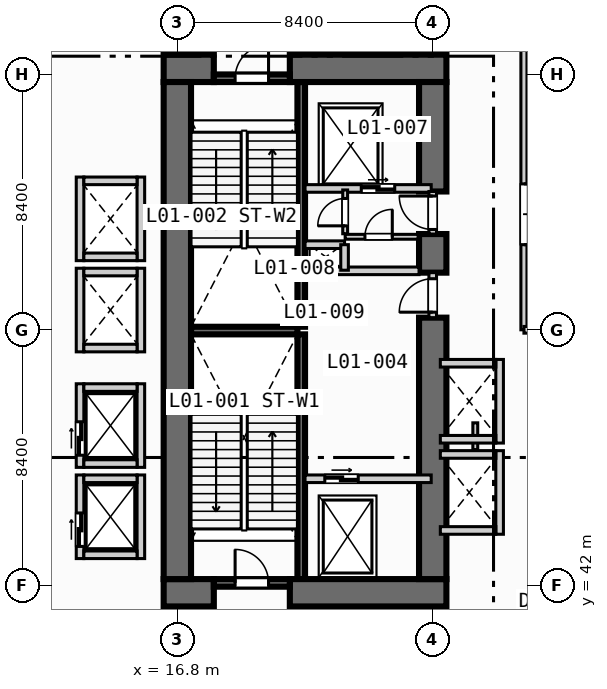
"""IFC4 building model, lengths in metres.
Left out: names, types, materials, properties, quantities, classifications, styles, units other than length and angle.
Written with IfcOpenShell. Run it as: python <this file> out.ifc"""

import sys

from ifc_helpers import new_model, si_unit, direction, frame, frame_2d, origin, place, context, subcontext, project, spatial, rectangle, extrude, element, fill, save


model = new_model("IFC4")
c1 = context("Model", 3, precision=1e-05, world=origin(), true_north=direction((0.0, 1.0)))
c2 = subcontext(c1, "Body", "Model", "MODEL_VIEW")
j1 = project(units=[si_unit("LENGTHUNIT", "METRE"), si_unit("PLANEANGLEUNIT", "RADIAN")], contexts=[c1])
p1 = place(None, origin())
s1 = spatial("IfcSite", under=j1, at=p1, CompositionType="ELEMENT")
p2 = place(p1, origin())
s2 = spatial("IfcBuilding", under=s1, at=p2, CompositionType="ELEMENT")
p3 = place(p2, frame((0.0, 0.0, 6.0)))
s3 = spatial("IfcBuildingStorey", under=s2, at=p3, CompositionType="ELEMENT", Elevation=6.0)
for number, where, z_axis, x_axis in (
    (1, (20.875, 42.2, 0.0), (0.0, 0.0, 1.0), (0.0, 1.0, 0.0)),
    (2, (20.875, 50.5, 0.0), (0.0, 0.0, 1.0), (0.0, 1.0, 0.0)),
):
    element("IfcWall", number, at=place(p3, frame(where, z_axis=z_axis, x_axis=x_axis)), inside=s3, PredefinedType="SOLIDWALL", context=c2, shape_type="SweptSolid", body=[
        extrude(rectangle(XDim=8.05, YDim=0.25, at=frame_2d((4.025, 0.0))), origin(), (0.0, 0.0, 1.0), 4.45),
    ])
p4 = place(p3, frame((17.25, 50.375, 0.0), z_axis=(0.0, 0.0, 1.0), x_axis=(1.0, 0.0, 0.0)))
e3 = element("IfcWall", 3, at=p4, inside=s3, PredefinedType="SOLIDWALL", context=c2, shape_type="SweptSolid", body=[
    extrude(rectangle(XDim=3.5, YDim=0.25, at=frame_2d((1.75, 0.0))), origin(), (0.0, 0.0, 1.0), 4.45),
])
p5 = place(p3, frame((16.35, 41.75, 0.0), z_axis=(0.0, 0.0, 1.0), x_axis=(1.0, 0.0, 0.0)))
e4 = element("IfcWall", 4, at=p5, inside=s3, PredefinedType="SHEAR", context=c2, shape_type="SweptSolid", body=[
    extrude(rectangle(XDim=1.65, YDim=0.9, at=frame_2d((0.825, 0.0))), origin(), (0.0, 0.0, 1.0), 4.45),
])
p6 = place(p3, frame((20.5, 41.75, 0.0), z_axis=(0.0, 0.0, 1.0), x_axis=(1.0, 0.0, 0.0)))
e5 = element("IfcWall", 5, at=p6, inside=s3, PredefinedType="SHEAR", context=c2, shape_type="SweptSolid", body=[
    extrude(rectangle(XDim=5.15, YDim=0.9, at=frame_2d((2.575, 0.0))), origin(), (0.0, 0.0, 1.0), 4.45),
])
p7 = place(p3, frame((16.35, 59.0, 0.0), z_axis=(0.0, 0.0, 1.0), x_axis=(1.0, 0.0, 0.0)))
e6 = element("IfcWall", 6, at=p7, inside=s3, PredefinedType="SHEAR", context=c2, shape_type="SweptSolid", body=[
    extrude(rectangle(XDim=1.65, YDim=0.9, at=frame_2d((0.825, 0.0))), origin(), (0.0, 0.0, 1.0), 4.45),
])
p8 = place(p3, frame((20.5, 59.0, 0.0), z_axis=(0.0, 0.0, 1.0), x_axis=(1.0, 0.0, 0.0)))
e7 = element("IfcWall", 7, at=p8, inside=s3, PredefinedType="SHEAR", context=c2, shape_type="SweptSolid", body=[
    extrude(rectangle(XDim=5.15, YDim=0.9, at=frame_2d((2.575, 0.0))), origin(), (0.0, 0.0, 1.0), 4.45),
])
p9 = place(p3, frame((16.8, 42.2, 0.0), z_axis=(0.0, 0.0, 1.0), x_axis=(0.0, 1.0, 0.0)))
e8 = element("IfcWall", 8, at=p9, inside=s3, PredefinedType="SHEAR", context=c2, shape_type="SweptSolid", body=[
    extrude(rectangle(XDim=16.35, YDim=0.9, at=frame_2d((8.175, 0.0))), origin(), (0.0, 0.0, 1.0), 4.45),
])
p10 = place(p3, frame((25.2, 42.2, 0.0), z_axis=(0.0, 0.0, 1.0), x_axis=(0.0, 1.0, 0.0)))
e9 = element("IfcWall", 9, at=p10, inside=s3, PredefinedType="SHEAR", context=c2, shape_type="SweptSolid", body=[
    extrude(rectangle(XDim=8.6, YDim=0.9, at=frame_2d((4.3, 0.0))), origin(), (0.0, 0.0, 1.0), 4.45),
])
p11 = place(p3, frame((25.2, 52.28, 0.0), z_axis=(0.0, 0.0, 1.0), x_axis=(0.0, 1.0, 0.0)))
e10 = element("IfcWall", 10, at=p11, inside=s3, PredefinedType="SHEAR", context=c2, shape_type="SweptSolid", body=[
    extrude(rectangle(XDim=1.27, YDim=0.9, at=frame_2d((0.635, 0.0))), origin(), (0.0, 0.0, 1.0), 4.45),
])
p12 = place(p3, frame((25.2, 54.95, 0.0), z_axis=(0.0, 0.0, 1.0), x_axis=(0.0, 1.0, 0.0)))
e11 = element("IfcWall", 11, at=p12, inside=s3, PredefinedType="SHEAR", context=c2, shape_type="SweptSolid", body=[
    extrude(rectangle(XDim=3.6, YDim=0.9, at=frame_2d((1.8, 0.0))), origin(), (0.0, 0.0, 1.0), 4.45),
])
p13 = place(p3, frame((18.0, 42.075, 0.0), z_axis=(0.0, 0.0, 1.0), x_axis=(1.0, 0.0, 0.0)))
e12 = element("IfcWall", 12, at=p13, inside=s3, PredefinedType="SOLIDWALL", context=c2, shape_type="SweptSolid", body=[
    extrude(rectangle(XDim=2.5, YDim=0.25, at=frame_2d((1.25, 0.0))), origin(), (0.0, 0.0, 1.0), 4.45),
])
p14 = place(p13, frame((0.7, 0.0, 0.0)))
e13 = element("IfcOpeningElement", 13, at=p14, cuts=e12, PredefinedType="OPENING", context=c2, shape_type="SweptSolid", body=[
    extrude(rectangle(XDim=1.1, YDim=2.15, at=frame_2d((0.55, 1.075))), frame((0.0, 0.135, 0.0), z_axis=(0.0, -1.0, 0.0), x_axis=(1.0, 0.0, 0.0)), (0.0, 0.0, 1.0), 0.27),
])
p15 = place(p3, frame((18.0, 58.675, 0.0), z_axis=(0.0, 0.0, 1.0), x_axis=(1.0, 0.0, 0.0)))
e14 = element("IfcWall", 14, at=p15, inside=s3, PredefinedType="SOLIDWALL", context=c2, shape_type="SweptSolid", body=[
    extrude(rectangle(XDim=2.5, YDim=0.25, at=frame_2d((1.25, 0.0))), origin(), (0.0, 0.0, 1.0), 4.45),
])
p16 = place(p15, frame((0.7, 0.0, 0.0)))
e15 = element("IfcOpeningElement", 15, at=p16, cuts=e14, PredefinedType="OPENING", context=c2, shape_type="SweptSolid", body=[
    extrude(rectangle(XDim=1.1, YDim=2.15, at=frame_2d((0.55, 1.075))), frame((0.0, 0.135, 0.0), z_axis=(0.0, -1.0, 0.0), x_axis=(1.0, 0.0, 0.0)), (0.0, 0.0, 1.0), 0.27),
])
p17 = place(p3, frame((21.0, 45.5, 0.0), z_axis=(0.0, 0.0, 1.0), x_axis=(1.0, 0.0, 0.0)))
e16 = element("IfcWall", 16, at=p17, inside=s3, PredefinedType="SOLIDWALL", context=c2, shape_type="SweptSolid", body=[
    extrude(rectangle(XDim=4.15, YDim=0.25, at=frame_2d((2.075, 0.0))), origin(), (0.0, 0.0, 1.0), 4.45),
])
p18 = place(p17, frame((0.65, 0.0, 0.0)))
e17 = element("IfcOpeningElement", 17, at=p18, cuts=e16, PredefinedType="OPENING", context=c2, shape_type="SweptSolid", body=[
    extrude(rectangle(XDim=1.1, YDim=2.15, at=frame_2d((0.55, 1.075))), frame((0.0, 0.135, 0.0), z_axis=(0.0, -1.0, 0.0), x_axis=(1.0, 0.0, 0.0)), (0.0, 0.0, 1.0), 0.27),
])
p19 = place(p3, frame((25.2, 50.8, 0.0), z_axis=(0.0, 0.0, 1.0), x_axis=(0.0, 1.0, 0.0)))
e18 = element("IfcWall", 18, at=p19, inside=s3, PredefinedType="SOLIDWALL", context=c2, shape_type="SweptSolid", body=[
    extrude(rectangle(XDim=1.48, YDim=0.25, at=frame_2d((0.74, 0.0))), origin(), (0.0, 0.0, 1.0), 4.45),
])
p20 = place(p19, frame((0.18, 0.0, 0.0)))
e19 = element("IfcOpeningElement", 19, at=p20, cuts=e18, PredefinedType="OPENING", context=c2, shape_type="SweptSolid", body=[
    extrude(rectangle(XDim=1.1, YDim=2.15, at=frame_2d((0.55, 1.075))), frame((0.0, 0.135, 0.0), z_axis=(0.0, -1.0, 0.0), x_axis=(1.0, 0.0, 0.0)), (0.0, 0.0, 1.0), 0.27),
])
p21 = place(p3, frame((21.0, 52.34, 0.0), z_axis=(0.0, 0.0, 1.0), x_axis=(1.0, 0.0, 0.0)))
e20 = element("IfcWall", 20, at=p21, inside=s3, PredefinedType="SOLIDWALL", context=c2, shape_type="SweptSolid", body=[
    extrude(rectangle(XDim=3.75, YDim=0.25, at=frame_2d((1.875, 0.0))), origin(), (0.0, 0.0, 1.0), 4.45),
])
p22 = place(p3, frame((21.0, 55.05, 0.0), z_axis=(0.0, 0.0, 1.0), x_axis=(1.0, 0.0, 0.0)))
e21 = element("IfcWall", 21, at=p22, inside=s3, PredefinedType="SOLIDWALL", context=c2, shape_type="SweptSolid", body=[
    extrude(rectangle(XDim=4.15, YDim=0.25, at=frame_2d((2.075, 0.0))), origin(), (0.0, 0.0, 1.0), 4.45),
])
p23 = place(p22, frame((1.85, 0.0, 0.0)))
e22 = element("IfcOpeningElement", 22, at=p23, cuts=e21, PredefinedType="OPENING", context=c2, shape_type="SweptSolid", body=[
    extrude(rectangle(XDim=1.1, YDim=2.15, at=frame_2d((0.55, 1.075))), frame((0.0, 0.135, 0.0), z_axis=(0.0, -1.0, 0.0), x_axis=(1.0, 0.0, 0.0)), (0.0, 0.0, 1.0), 0.27),
])
p24 = place(p3, frame((25.2, 53.55, 0.0), z_axis=(0.0, 0.0, 1.0), x_axis=(0.0, 1.0, 0.0)))
e23 = element("IfcWall", 23, at=p24, inside=s3, PredefinedType="SOLIDWALL", context=c2, shape_type="SweptSolid", body=[
    extrude(rectangle(XDim=1.4, YDim=0.25, at=frame_2d((0.7, 0.0))), origin(), (0.0, 0.0, 1.0), 4.45),
])
p25 = place(p24, frame((0.15, 0.0, 0.0)))
e24 = element("IfcOpeningElement", 24, at=p25, cuts=e23, PredefinedType="OPENING", context=c2, shape_type="SweptSolid", body=[
    extrude(rectangle(XDim=1.1, YDim=2.15, at=frame_2d((0.55, 1.075))), frame((0.0, 0.135, 0.0), z_axis=(0.0, -1.0, 0.0), x_axis=(1.0, 0.0, 0.0)), (0.0, 0.0, 1.0), 0.27),
])
p26 = place(p3, frame((21.0, 53.2, 0.0), z_axis=(0.0, 0.0, 1.0), x_axis=(1.0, 0.0, 0.0)))
e25 = element("IfcWall", 25, at=p26, inside=s3, PredefinedType="SOLIDWALL", context=c2, shape_type="SweptSolid", body=[
    extrude(rectangle(XDim=1.3, YDim=0.25, at=frame_2d((0.65, 0.0))), origin(), (0.0, 0.0, 1.0), 4.45),
])
p27 = place(p3, frame((22.3, 52.36, 0.0), z_axis=(0.0, 0.0, 1.0), x_axis=(0.0, 1.0, 0.0)))
e26 = element("IfcWall", 26, at=p27, inside=s3, PredefinedType="SOLIDWALL", context=c2, shape_type="SweptSolid", body=[
    extrude(rectangle(XDim=0.84, YDim=0.25, at=frame_2d((0.42, 0.0))), origin(), (0.0, 0.0, 1.0), 4.45),
])
p28 = place(p3, frame((22.32, 53.56, 0.0), z_axis=(0.0, 0.0, 1.0), x_axis=(0.0, 1.0, 0.0)))
e27 = element("IfcWall", 27, at=p28, inside=s3, PredefinedType="PARTITIONING", context=c2, shape_type="SweptSolid", body=[
    extrude(rectangle(XDim=1.44, YDim=0.16, at=frame_2d((0.72, 0.0))), origin(), (0.0, 0.0, 1.0), 4.45),
])
p29 = place(p28, frame((0.26, 0.0, 0.0)))
e28 = element("IfcOpeningElement", 28, at=p29, cuts=e27, PredefinedType="OPENING", context=c2, shape_type="SweptSolid", body=[
    extrude(rectangle(XDim=0.9, YDim=2.1, at=frame_2d((0.45, 1.05))), frame((0.0, 0.09, 0.0), z_axis=(0.0, -1.0, 0.0), x_axis=(1.0, 0.0, 0.0)), (0.0, 0.0, 1.0), 0.18),
])
p30 = place(p3, frame((22.32, 53.46, 0.0), z_axis=(0.0, 0.0, 1.0), x_axis=(1.0, 0.0, 0.0)))
e29 = element("IfcWall", 29, at=p30, inside=s3, PredefinedType="PARTITIONING", context=c2, shape_type="SweptSolid", body=[
    extrude(rectangle(XDim=2.4, YDim=0.16, at=frame_2d((1.2, 0.0))), origin(), (0.0, 0.0, 1.0), 4.45),
])
p31 = place(p30, frame((0.65, 0.0, 0.0)))
e30 = element("IfcOpeningElement", 30, at=p31, cuts=e29, PredefinedType="OPENING", context=c2, shape_type="SweptSolid", body=[
    extrude(rectangle(XDim=0.9, YDim=2.1, at=frame_2d((0.45, 1.05))), frame((0.0, 0.09, 0.0), z_axis=(0.0, -1.0, 0.0), x_axis=(1.0, 0.0, 0.0)), (0.0, 0.0, 1.0), 0.18),
])
p32 = place(p3, frame((13.6, 42.875, 0.0), z_axis=(0.0, 0.0, 1.0), x_axis=(0.0, 1.0, 0.0)))
e31 = element("IfcWall", 31, at=p32, inside=s3, PredefinedType="SOLIDWALL", context=c2, shape_type="SweptSolid", body=[
    extrude(rectangle(XDim=2.75, YDim=0.25, at=frame_2d((1.375, 0.0))), origin(), (0.0, 0.0, 1.0), 4.45),
])
p33 = place(p32, frame((0.4, 0.0, 0.0)))
e32 = element("IfcOpeningElement", 32, at=p33, cuts=e31, PredefinedType="OPENING", context=c2, shape_type="SweptSolid", body=[
    extrude(rectangle(XDim=1.1, YDim=2.15, at=frame_2d((0.55, 1.075))), frame((0.0, 0.135, 0.0), z_axis=(0.0, -1.0, 0.0), x_axis=(1.0, 0.0, 0.0)), (0.0, 0.0, 1.0), 0.27),
])
p34 = place(p3, frame((15.6, 42.875, 0.0), z_axis=(0.0, 0.0, 1.0), x_axis=(0.0, 1.0, 0.0)))
e33 = element("IfcWall", 33, at=p34, inside=s3, PredefinedType="SOLIDWALL", context=c2, shape_type="SweptSolid", body=[
    extrude(rectangle(XDim=2.75, YDim=0.25, at=frame_2d((1.375, 0.0))), origin(), (0.0, 0.0, 1.0), 4.45),
])
for number, where, z_axis, x_axis in (
    (34, (13.725, 43.0, 0.0), (0.0, 0.0, 1.0), (1.0, 0.0, 0.0)),
    (35, (13.725, 45.5, 0.0), (0.0, 0.0, 1.0), (1.0, 0.0, 0.0)),
):
    element("IfcWall", number, at=place(p3, frame(where, z_axis=z_axis, x_axis=x_axis)), inside=s3, PredefinedType="SOLIDWALL", context=c2, shape_type="SweptSolid", body=[
        extrude(rectangle(XDim=1.75, YDim=0.25, at=frame_2d((0.875, 0.0))), origin(), (0.0, 0.0, 1.0), 4.45),
    ])
p35 = place(p3, frame((13.6, 45.875, 0.0), z_axis=(0.0, 0.0, 1.0), x_axis=(0.0, 1.0, 0.0)))
e36 = element("IfcWall", 36, at=p35, inside=s3, PredefinedType="SOLIDWALL", context=c2, shape_type="SweptSolid", body=[
    extrude(rectangle(XDim=2.75, YDim=0.25, at=frame_2d((1.375, 0.0))), origin(), (0.0, 0.0, 1.0), 4.45),
])
p36 = place(p35, frame((0.4, 0.0, 0.0)))
e37 = element("IfcOpeningElement", 37, at=p36, cuts=e36, PredefinedType="OPENING", context=c2, shape_type="SweptSolid", body=[
    extrude(rectangle(XDim=1.1, YDim=2.15, at=frame_2d((0.55, 1.075))), frame((0.0, 0.135, 0.0), z_axis=(0.0, -1.0, 0.0), x_axis=(1.0, 0.0, 0.0)), (0.0, 0.0, 1.0), 0.27),
])
p37 = place(p3, frame((15.6, 45.875, 0.0), z_axis=(0.0, 0.0, 1.0), x_axis=(0.0, 1.0, 0.0)))
e38 = element("IfcWall", 38, at=p37, inside=s3, PredefinedType="SOLIDWALL", context=c2, shape_type="SweptSolid", body=[
    extrude(rectangle(XDim=2.75, YDim=0.25, at=frame_2d((1.375, 0.0))), origin(), (0.0, 0.0, 1.0), 4.45),
])
for number, where, z_axis, x_axis in (
    (39, (13.725, 46.0, 0.0), (0.0, 0.0, 1.0), (1.0, 0.0, 0.0)),
    (40, (13.725, 48.5, 0.0), (0.0, 0.0, 1.0), (1.0, 0.0, 0.0)),
):
    element("IfcWall", number, at=place(p3, frame(where, z_axis=z_axis, x_axis=x_axis)), inside=s3, PredefinedType="SOLIDWALL", context=c2, shape_type="SweptSolid", body=[
        extrude(rectangle(XDim=1.75, YDim=0.25, at=frame_2d((0.875, 0.0))), origin(), (0.0, 0.0, 1.0), 4.45),
    ])
for number, where, z_axis, x_axis in (
    (41, (13.6, 49.675, 0.0), (0.0, 0.0, 1.0), (0.0, 1.0, 0.0)),
    (42, (15.6, 49.675, 0.0), (0.0, 0.0, 1.0), (0.0, 1.0, 0.0)),
):
    element("IfcWall", number, at=place(p3, frame(where, z_axis=z_axis, x_axis=x_axis)), inside=s3, PredefinedType="SOLIDWALL", context=c2, shape_type="SweptSolid", body=[
        extrude(rectangle(XDim=2.75, YDim=0.25, at=frame_2d((1.375, 0.0))), origin(), (0.0, 0.0, 1.0), 4.45),
    ])
for number, where, z_axis, x_axis in (
    (43, (13.725, 49.8, 0.0), (0.0, 0.0, 1.0), (1.0, 0.0, 0.0)),
    (44, (13.725, 52.3, 0.0), (0.0, 0.0, 1.0), (1.0, 0.0, 0.0)),
):
    element("IfcWall", number, at=place(p3, frame(where, z_axis=z_axis, x_axis=x_axis)), inside=s3, PredefinedType="SOLIDWALL", context=c2, shape_type="SweptSolid", body=[
        extrude(rectangle(XDim=1.75, YDim=0.25, at=frame_2d((0.875, 0.0))), origin(), (0.0, 0.0, 1.0), 4.45),
    ])
for number, where, z_axis, x_axis in (
    (45, (13.6, 52.675, 0.0), (0.0, 0.0, 1.0), (0.0, 1.0, 0.0)),
    (46, (15.6, 52.675, 0.0), (0.0, 0.0, 1.0), (0.0, 1.0, 0.0)),
):
    element("IfcWall", number, at=place(p3, frame(where, z_axis=z_axis, x_axis=x_axis)), inside=s3, PredefinedType="SOLIDWALL", context=c2, shape_type="SweptSolid", body=[
        extrude(rectangle(XDim=2.75, YDim=0.25, at=frame_2d((1.375, 0.0))), origin(), (0.0, 0.0, 1.0), 4.45),
    ])
for number, where, z_axis, x_axis in (
    (47, (13.725, 52.8, 0.0), (0.0, 0.0, 1.0), (1.0, 0.0, 0.0)),
    (48, (13.725, 55.3, 0.0), (0.0, 0.0, 1.0), (1.0, 0.0, 0.0)),
):
    element("IfcWall", number, at=place(p3, frame(where, z_axis=z_axis, x_axis=x_axis)), inside=s3, PredefinedType="SOLIDWALL", context=c2, shape_type="SweptSolid", body=[
        extrude(rectangle(XDim=1.75, YDim=0.25, at=frame_2d((0.875, 0.0))), origin(), (0.0, 0.0, 1.0), 4.45),
    ])
p38 = place(p3, frame((27.4, 43.675, 0.0), z_axis=(0.0, 0.0, 1.0), x_axis=(0.0, 1.0, 0.0)))
e49 = element("IfcWall", 49, at=p38, inside=s3, PredefinedType="SOLIDWALL", context=c2, shape_type="SweptSolid", body=[
    extrude(rectangle(XDim=2.75, YDim=0.25, at=frame_2d((1.375, 0.0))), origin(), (0.0, 0.0, 1.0), 4.45),
])
for number, where, z_axis, x_axis in (
    (50, (25.45, 43.8, 0.0), (0.0, 0.0, 1.0), (1.0, 0.0, 0.0)),
    (51, (25.45, 46.3, 0.0), (0.0, 0.0, 1.0), (1.0, 0.0, 0.0)),
):
    element("IfcWall", number, at=place(p3, frame(where, z_axis=z_axis, x_axis=x_axis)), inside=s3, PredefinedType="SOLIDWALL", context=c2, shape_type="SweptSolid", body=[
        extrude(rectangle(XDim=1.825, YDim=0.25, at=frame_2d((0.913, 0.0))), origin(), (0.0, 0.0, 1.0), 4.45),
    ])
p39 = place(p3, frame((26.6, 46.46, 0.0), z_axis=(0.0, 0.0, 1.0), x_axis=(0.0, 1.0, 0.0)))
e52 = element("IfcWall", 52, at=p39, inside=s3, PredefinedType="PARTITIONING", context=c2, shape_type="SweptSolid", body=[
    extrude(rectangle(XDim=0.88, YDim=0.16, at=frame_2d((0.44, 0.0))), origin(), (0.0, 0.0, 1.0), 4.45),
])
p40 = place(p3, frame((27.4, 46.675, 0.0), z_axis=(0.0, 0.0, 1.0), x_axis=(0.0, 1.0, 0.0)))
e53 = element("IfcWall", 53, at=p40, inside=s3, PredefinedType="SOLIDWALL", context=c2, shape_type="SweptSolid", body=[
    extrude(rectangle(XDim=2.75, YDim=0.25, at=frame_2d((1.375, 0.0))), origin(), (0.0, 0.0, 1.0), 4.45),
])
for number, where, z_axis, x_axis in (
    (54, (25.45, 46.8, 0.0), (0.0, 0.0, 1.0), (1.0, 0.0, 0.0)),
    (55, (25.45, 49.3, 0.0), (0.0, 0.0, 1.0), (1.0, 0.0, 0.0)),
):
    element("IfcWall", number, at=place(p3, frame(where, z_axis=z_axis, x_axis=x_axis)), inside=s3, PredefinedType="SOLIDWALL", context=c2, shape_type="SweptSolid", body=[
        extrude(rectangle(XDim=1.825, YDim=0.25, at=frame_2d((0.913, 0.0))), origin(), (0.0, 0.0, 1.0), 4.45),
    ])
p41 = place(p3, frame((28.2, 50.4, 0.0), z_axis=(0.0, 0.0, 1.0), x_axis=(0.0, 1.0, 0.0)))
e56 = element("IfcWall", 56, at=p41, inside=s3, PredefinedType="PARTITIONING", context=c2, shape_type="SweptSolid", body=[
    extrude(rectangle(XDim=38.6, YDim=0.2, at=frame_2d((19.3, 0.0))), origin(), (0.0, 0.0, 1.0), 4.45),
])
p42 = place(p41, frame((2.8, 0.0, 0.0)))
e57 = element("IfcOpeningElement", 57, at=p42, cuts=e56, PredefinedType="OPENING", context=c2, shape_type="SweptSolid", body=[
    extrude(rectangle(XDim=2.0, YDim=2.15, at=frame_2d((1.0, 1.075))), frame((0.0, 0.11, 0.0), z_axis=(0.0, -1.0, 0.0), x_axis=(1.0, 0.0, 0.0)), (0.0, 0.0, 1.0), 0.22),
])
p43 = place(p41, frame((16.8, 0.0, 0.0)))
e58 = element("IfcOpeningElement", 58, at=p43, cuts=e56, PredefinedType="OPENING", context=c2, shape_type="SweptSolid", body=[
    extrude(rectangle(XDim=2.0, YDim=2.15, at=frame_2d((1.0, 1.075))), frame((0.0, 0.11, 0.0), z_axis=(0.0, -1.0, 0.0), x_axis=(1.0, 0.0, 0.0)), (0.0, 0.0, 1.0), 0.22),
])
p44 = place(p41, frame((30.8, 0.0, 0.0)))
e59 = element("IfcOpeningElement", 59, at=p44, cuts=e56, PredefinedType="OPENING", context=c2, shape_type="SweptSolid", body=[
    extrude(rectangle(XDim=2.0, YDim=2.15, at=frame_2d((1.0, 1.075))), frame((0.0, 0.11, 0.0), z_axis=(0.0, -1.0, 0.0), x_axis=(1.0, 0.0, 0.0)), (0.0, 0.0, 1.0), 0.22),
])
p45 = place(p3, frame((28.2, 50.4, 0.0), z_axis=(0.0, 0.0, 1.0), x_axis=(1.0, 0.0, 0.0)))
e60 = element("IfcWall", 60, at=p45, inside=s3, PredefinedType="PARTITIONING", context=c2, shape_type="SweptSolid", body=[
    extrude(rectangle(XDim=13.4, YDim=0.22, at=frame_2d((6.7, 0.0))), origin(), (0.0, 0.0, 1.0), 3.6),
])
p46 = place(p14, origin())
e61 = element("IfcDoor", 61, at=p46, inside=s3, OperationType="SINGLE_SWING_LEFT", PredefinedType="DOOR", context=c2, shape_type="SweptSolid", body=[
    extrude(rectangle(XDim=1.1, YDim=2.15, at=frame_2d((0.55, 1.075))), frame((0.0, 0.025, 0.0), z_axis=(0.0, -1.0, 0.0), x_axis=(1.0, 0.0, 0.0)), (0.0, 0.0, 1.0), 0.05),
])
fill(e13, e61)
p47 = place(p16, origin())
e62 = element("IfcDoor", 62, at=p47, inside=s3, OperationType="SINGLE_SWING_RIGHT", PredefinedType="DOOR", context=c2, shape_type="SweptSolid", body=[
    extrude(rectangle(XDim=1.1, YDim=2.15, at=frame_2d((0.55, 1.075))), frame((0.0, 0.025, 0.0), z_axis=(0.0, -1.0, 0.0), x_axis=(1.0, 0.0, 0.0)), (0.0, 0.0, 1.0), 0.05),
])
fill(e15, e62)
p48 = place(p18, origin())
e63 = element("IfcDoor", 63, at=p48, inside=s3, OperationType="SLIDING_TO_LEFT", PredefinedType="DOOR", context=c2, shape_type="SweptSolid", body=[
    extrude(rectangle(XDim=1.1, YDim=2.15, at=frame_2d((0.55, 1.075))), frame((0.0, 0.025, 0.0), z_axis=(0.0, -1.0, 0.0), x_axis=(1.0, 0.0, 0.0)), (0.0, 0.0, 1.0), 0.05),
])
fill(e17, e63)
p49 = place(p20, origin())
e64 = element("IfcDoor", 64, at=p49, inside=s3, OperationType="SINGLE_SWING_LEFT", PredefinedType="DOOR", context=c2, shape_type="SweptSolid", body=[
    extrude(rectangle(XDim=1.1, YDim=2.15, at=frame_2d((0.55, 1.075))), frame((0.0, 0.025, 0.0), z_axis=(0.0, -1.0, 0.0), x_axis=(1.0, 0.0, 0.0)), (0.0, 0.0, 1.0), 0.05),
])
fill(e19, e64)
p50 = place(p23, origin())
e65 = element("IfcDoor", 65, at=p50, inside=s3, OperationType="SLIDING_TO_LEFT", PredefinedType="DOOR", context=c2, shape_type="SweptSolid", body=[
    extrude(rectangle(XDim=1.1, YDim=2.15, at=frame_2d((0.55, 1.075))), frame((0.0, 0.025, 0.0), z_axis=(0.0, -1.0, 0.0), x_axis=(1.0, 0.0, 0.0)), (0.0, 0.0, 1.0), 0.05),
])
fill(e22, e65)
p51 = place(p25, origin())
e66 = element("IfcDoor", 66, at=p51, inside=s3, OperationType="SINGLE_SWING_RIGHT", PredefinedType="DOOR", context=c2, shape_type="SweptSolid", body=[
    extrude(rectangle(XDim=1.1, YDim=2.15, at=frame_2d((0.55, 1.075))), frame((0.0, 0.025, 0.0), z_axis=(0.0, -1.0, 0.0), x_axis=(1.0, 0.0, 0.0)), (0.0, 0.0, 1.0), 0.05),
])
fill(e24, e66)
p52 = place(p29, origin())
e67 = element("IfcDoor", 67, at=p52, inside=s3, OperationType="SINGLE_SWING_LEFT", PredefinedType="DOOR", context=c2, shape_type="SweptSolid", body=[
    extrude(rectangle(XDim=0.9, YDim=2.1, at=frame_2d((0.45, 1.05))), frame((0.0, 0.025, 0.0), z_axis=(0.0, -1.0, 0.0), x_axis=(1.0, 0.0, 0.0)), (0.0, 0.0, 1.0), 0.05),
])
fill(e28, e67)
p53 = place(p31, origin())
e68 = element("IfcDoor", 68, at=p53, inside=s3, OperationType="SINGLE_SWING_RIGHT", PredefinedType="DOOR", context=c2, shape_type="SweptSolid", body=[
    extrude(rectangle(XDim=0.9, YDim=2.1, at=frame_2d((0.45, 1.05))), frame((0.0, 0.025, 0.0), z_axis=(0.0, -1.0, 0.0), x_axis=(1.0, 0.0, 0.0)), (0.0, 0.0, 1.0), 0.05),
])
fill(e30, e68)
p54 = place(p33, origin())
e69 = element("IfcDoor", 69, at=p54, inside=s3, OperationType="SLIDING_TO_LEFT", PredefinedType="DOOR", context=c2, shape_type="SweptSolid", body=[
    extrude(rectangle(XDim=1.1, YDim=2.15, at=frame_2d((0.55, 1.075))), frame((0.0, 0.025, 0.0), z_axis=(0.0, -1.0, 0.0), x_axis=(1.0, 0.0, 0.0)), (0.0, 0.0, 1.0), 0.05),
])
fill(e32, e69)
p55 = place(p36, origin())
e70 = element("IfcDoor", 70, at=p55, inside=s3, OperationType="SLIDING_TO_LEFT", PredefinedType="DOOR", context=c2, shape_type="SweptSolid", body=[
    extrude(rectangle(XDim=1.1, YDim=2.15, at=frame_2d((0.55, 1.075))), frame((0.0, 0.025, 0.0), z_axis=(0.0, -1.0, 0.0), x_axis=(1.0, 0.0, 0.0)), (0.0, 0.0, 1.0), 0.05),
])
fill(e37, e70)
p56 = place(p42, origin())
e71 = element("IfcDoor", 71, at=p56, inside=s3, OperationType="SINGLE_SWING_RIGHT", PredefinedType="DOOR", context=c2, shape_type="SweptSolid", body=[
    extrude(rectangle(XDim=2.0, YDim=2.15, at=frame_2d((1.0, 1.075))), frame((0.0, 0.025, 0.0), z_axis=(0.0, -1.0, 0.0), x_axis=(1.0, 0.0, 0.0)), (0.0, 0.0, 1.0), 0.05),
])
fill(e57, e71)
save(model, sys.argv[1])
